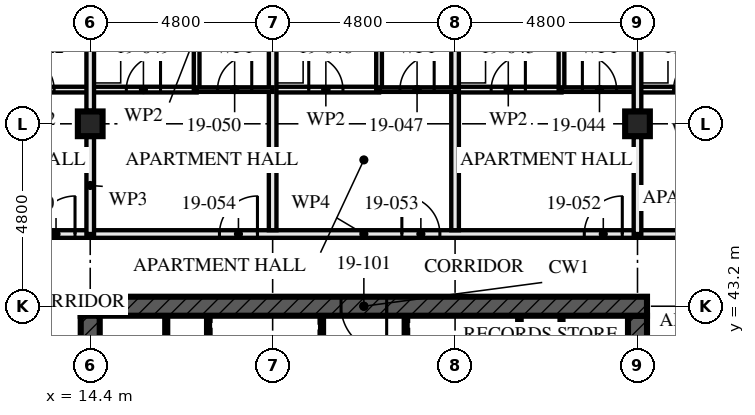
"""IFC4 building model, lengths in metres.
Left out: names, types, materials, properties, quantities, classifications, styles, units other than length and angle.
Written with IfcOpenShell. Run it as: python <this file> out.ifc"""

import sys

from ifc_helpers import new_model, si_unit, direction, frame, frame_2d, origin, origin_2d, place, context, subcontext, project, spatial, rectangle, hollow_rectangle, extrude, element, fill, save


model = new_model("IFC4")
c1 = context("Model", 3, precision=1e-05, world=origin(), true_north=direction((0.0, 1.0)))
c2 = subcontext(c1, "Body", "Model", "MODEL_VIEW")
j1 = project(units=[si_unit("LENGTHUNIT", "METRE"), si_unit("PLANEANGLEUNIT", "RADIAN")], contexts=[c1])
p1 = place(None, origin())
s1 = spatial("IfcSite", under=j1, at=p1, CompositionType="ELEMENT")
p2 = place(p1, origin())
s2 = spatial("IfcBuilding", under=s1, at=p2, CompositionType="ELEMENT")
p3 = place(p2, frame((0.0, 0.0, 72.5)))
s3 = spatial("IfcBuildingStorey", under=s2, at=p3, CompositionType="ELEMENT", Elevation=72.5)
for number, where, z_axis, x_axis in (
    (1, (14.4, 48.0, 0.0), (0.0, 0.0, 1.0), (1.0, 0.0, 0.0)),
    (2, (28.8, 48.0, 0.0), (0.0, 0.0, 1.0), (1.0, 0.0, 0.0)),
):
    element("IfcColumn", number, at=place(p3, frame(where, z_axis=z_axis, x_axis=x_axis)), inside=s3, PredefinedType="COLUMN", context=c2, shape_type="SweptSolid", body=[
        extrude(hollow_rectangle(XDim=0.65, YDim=0.65, WallThickness=0.05, at=origin_2d()), origin(), (0.0, 0.0, 1.0), 3.5),
    ])
p4 = place(p3, frame((29.05, 43.2, -0.17), z_axis=(0.0, 0.0, 1.0), x_axis=(-1.0, 0.0, 0.0)))
e3 = element("IfcWall", 3, at=p4, inside=s3, PredefinedType="SHEAR", context=c2, shape_type="SweptSolid", body=[
    extrude(rectangle(XDim=14.9, YDim=0.5, at=frame_2d((7.45, 0.0))), origin(), (0.0, 0.0, 1.0), 3.5),
])
p5 = place(p4, frame((6.85, 0.0, 0.17)))
e4 = element("IfcOpeningElement", 4, at=p5, cuts=e3, PredefinedType="OPENING", context=c2, shape_type="SweptSolid", body=[
    extrude(rectangle(XDim=1.2, YDim=2.1, at=frame_2d((0.6, 1.05))), frame((0.0, 0.26, 0.0), z_axis=(0.0, -1.0, 0.0), x_axis=(1.0, 0.0, 0.0)), (0.0, 0.0, 1.0), 0.521),
])
p6 = place(p3, frame((14.4, 42.95, -0.17), z_axis=(0.0, 0.0, 1.0), x_axis=(0.0, -1.0, 0.0)))
e5 = element("IfcWall", 5, at=p6, inside=s3, PredefinedType="SHEAR", context=c2, shape_type="SweptSolid", body=[
    extrude(rectangle(XDim=13.9, YDim=0.5, at=frame_2d((6.95, 0.0))), origin(), (0.0, 0.0, 1.0), 3.5),
])
p7 = place(p6, frame((6.35, 0.0, 0.17)))
e6 = element("IfcOpeningElement", 6, at=p7, cuts=e5, PredefinedType="OPENING", context=c2, shape_type="SweptSolid", body=[
    extrude(rectangle(XDim=1.2, YDim=2.1, at=frame_2d((0.6, 1.05))), frame((0.0, 0.26, 0.0), z_axis=(0.0, -1.0, 0.0), x_axis=(1.0, 0.0, 0.0)), (0.0, 0.0, 1.0), 0.521),
])
p8 = place(p3, frame((28.8, 29.05, -0.17), z_axis=(0.0, 0.0, 1.0), x_axis=(0.0, 1.0, 0.0)))
e7 = element("IfcWall", 7, at=p8, inside=s3, PredefinedType="SHEAR", context=c2, shape_type="SweptSolid", body=[
    extrude(rectangle(XDim=13.9, YDim=0.5, at=frame_2d((6.95, 0.0))), origin(), (0.0, 0.0, 1.0), 3.5),
])
p9 = place(p8, frame((6.35, 0.0, 0.17)))
e8 = element("IfcOpeningElement", 8, at=p9, cuts=e7, PredefinedType="OPENING", context=c2, shape_type="SweptSolid", body=[
    extrude(rectangle(XDim=1.2, YDim=2.1, at=frame_2d((0.6, 1.05))), frame((0.0, 0.26, 0.0), z_axis=(0.0, -1.0, 0.0), x_axis=(1.0, 0.0, 0.0)), (0.0, 0.0, 1.0), 0.521),
])
p10 = place(p3, frame((14.4, 48.9, 0.0), z_axis=(0.0, 0.0, 1.0), x_axis=(-1.0, 0.0, 0.0)))
e9 = element("IfcWall", 9, at=p10, inside=s3, PredefinedType="PARTITIONING", context=c2, shape_type="SweptSolid", body=[
    extrude(rectangle(XDim=2.8, YDim=0.15, at=frame_2d((1.4, 0.0))), origin(), (0.0, 0.0, 1.0), 3.33),
])
p11 = place(p10, frame((0.95, 0.0, 0.0)))
e10 = element("IfcOpeningElement", 10, at=p11, cuts=e9, PredefinedType="OPENING", context=c2, shape_type="SweptSolid", body=[
    extrude(rectangle(XDim=0.9, YDim=2.1, at=frame_2d((0.45, 1.05))), frame((0.0, 0.085, 0.0), z_axis=(0.0, -1.0, 0.0), x_axis=(1.0, 0.0, 0.0)), (0.0, 0.0, 1.0), 0.171),
])
p12 = place(p3, frame((14.4, 45.1, 0.0), z_axis=(0.0, 0.0, 1.0), x_axis=(-1.0, 0.0, 0.0)))
e11 = element("IfcWall", 11, at=p12, inside=s3, PredefinedType="PARTITIONING", context=c2, shape_type="SweptSolid", body=[
    extrude(rectangle(XDim=9.6, YDim=0.2, at=frame_2d((4.8, 0.0))), origin(), (0.0, 0.0, 1.0), 3.33),
])
p13 = place(p12, frame((0.4, 0.0, 0.0)))
e12 = element("IfcOpeningElement", 12, at=p13, cuts=e11, PredefinedType="OPENING", context=c2, shape_type="SweptSolid", body=[
    extrude(rectangle(XDim=1.0, YDim=2.1, at=frame_2d((0.5, 1.05))), frame((0.0, 0.111, 0.0), z_axis=(0.0, -1.0, 0.0), x_axis=(1.0, 0.0, 0.0)), (0.0, 0.0, 1.0), 0.221),
])
p14 = place(p12, frame((5.2, 0.0, 0.0)))
e13 = element("IfcOpeningElement", 13, at=p14, cuts=e11, PredefinedType="OPENING", context=c2, shape_type="SweptSolid", body=[
    extrude(rectangle(XDim=1.0, YDim=2.1, at=frame_2d((0.5, 1.05))), frame((0.0, 0.111, 0.0), z_axis=(0.0, -1.0, 0.0), x_axis=(1.0, 0.0, 0.0)), (0.0, 0.0, 1.0), 0.221),
])
p15 = place(p3, frame((26.8, 51.9, 0.0), z_axis=(0.0, 0.0, 1.0), x_axis=(0.0, -1.0, 0.0)))
e14 = element("IfcWall", 14, at=p15, inside=s3, PredefinedType="PARTITIONING", context=c2, shape_type="SweptSolid", body=[
    extrude(rectangle(XDim=3.0, YDim=0.15, at=frame_2d((1.5, 0.0))), origin(), (0.0, 0.0, 1.0), 3.33),
])
p16 = place(p3, frame((26.8, 48.9, 0.0), z_axis=(0.0, 0.0, 1.0), x_axis=(-1.0, 0.0, 0.0)))
e15 = element("IfcWall", 15, at=p16, inside=s3, PredefinedType="PARTITIONING", context=c2, shape_type="SweptSolid", body=[
    extrude(rectangle(XDim=2.8, YDim=0.15, at=frame_2d((1.4, 0.0))), origin(), (0.0, 0.0, 1.0), 3.33),
])
p17 = place(p16, frame((0.95, 0.0, 0.0)))
e16 = element("IfcOpeningElement", 16, at=p17, cuts=e15, PredefinedType="OPENING", context=c2, shape_type="SweptSolid", body=[
    extrude(rectangle(XDim=0.9, YDim=2.1, at=frame_2d((0.45, 1.05))), frame((0.0, 0.085, 0.0), z_axis=(0.0, -1.0, 0.0), x_axis=(1.0, 0.0, 0.0)), (0.0, 0.0, 1.0), 0.171),
])
p18 = place(p3, frame((28.8, 48.9, 0.0), z_axis=(0.0, 0.0, 1.0), x_axis=(-1.0, 0.0, 0.0)))
e17 = element("IfcWall", 17, at=p18, inside=s3, PredefinedType="PARTITIONING", context=c2, shape_type="SweptSolid", body=[
    extrude(rectangle(XDim=2.0, YDim=0.12, at=frame_2d((1.0, 0.0))), origin(), (0.0, 0.0, 1.0), 3.33),
])
p19 = place(p18, frame((0.55, 0.0, 0.0)))
e18 = element("IfcOpeningElement", 18, at=p19, cuts=e17, PredefinedType="OPENING", context=c2, shape_type="SweptSolid", body=[
    extrude(rectangle(XDim=0.9, YDim=2.1, at=frame_2d((0.45, 1.05))), frame((0.0, 0.071, 0.0), z_axis=(0.0, -1.0, 0.0), x_axis=(1.0, 0.0, 0.0)), (0.0, 0.0, 1.0), 0.141),
])
p20 = place(p3, frame((24.0, 57.28, 0.0), z_axis=(0.0, 0.0, 1.0), x_axis=(0.0, -1.0, 0.0)))
e19 = element("IfcWall", 19, at=p20, inside=s3, PredefinedType="PARTITIONING", context=c2, shape_type="SweptSolid", body=[
    extrude(rectangle(XDim=12.08, YDim=0.2, at=frame_2d((6.04, 0.0))), origin(), (0.0, 0.0, 1.0), 2.55),
])
p21 = place(p3, frame((22.0, 51.9, 0.0), z_axis=(0.0, 0.0, 1.0), x_axis=(0.0, -1.0, 0.0)))
e20 = element("IfcWall", 20, at=p21, inside=s3, PredefinedType="PARTITIONING", context=c2, shape_type="SweptSolid", body=[
    extrude(rectangle(XDim=3.0, YDim=0.15, at=frame_2d((1.5, 0.0))), origin(), (0.0, 0.0, 1.0), 3.33),
])
p22 = place(p3, frame((22.0, 48.9, 0.0), z_axis=(0.0, 0.0, 1.0), x_axis=(-1.0, 0.0, 0.0)))
e21 = element("IfcWall", 21, at=p22, inside=s3, PredefinedType="PARTITIONING", context=c2, shape_type="SweptSolid", body=[
    extrude(rectangle(XDim=2.8, YDim=0.15, at=frame_2d((1.4, 0.0))), origin(), (0.0, 0.0, 1.0), 3.33),
])
p23 = place(p22, frame((0.95, 0.0, 0.0)))
e22 = element("IfcOpeningElement", 22, at=p23, cuts=e21, PredefinedType="OPENING", context=c2, shape_type="SweptSolid", body=[
    extrude(rectangle(XDim=0.9, YDim=2.1, at=frame_2d((0.45, 1.05))), frame((0.0, 0.085, 0.0), z_axis=(0.0, -1.0, 0.0), x_axis=(1.0, 0.0, 0.0)), (0.0, 0.0, 1.0), 0.171),
])
p24 = place(p3, frame((24.0, 48.9, 0.0), z_axis=(0.0, 0.0, 1.0), x_axis=(-1.0, 0.0, 0.0)))
e23 = element("IfcWall", 23, at=p24, inside=s3, PredefinedType="PARTITIONING", context=c2, shape_type="SweptSolid", body=[
    extrude(rectangle(XDim=2.0, YDim=0.12, at=frame_2d((1.0, 0.0))), origin(), (0.0, 0.0, 1.0), 3.33),
])
p25 = place(p24, frame((0.55, 0.0, 0.0)))
e24 = element("IfcOpeningElement", 24, at=p25, cuts=e23, PredefinedType="OPENING", context=c2, shape_type="SweptSolid", body=[
    extrude(rectangle(XDim=0.9, YDim=2.1, at=frame_2d((0.45, 1.05))), frame((0.0, 0.071, 0.0), z_axis=(0.0, -1.0, 0.0), x_axis=(1.0, 0.0, 0.0)), (0.0, 0.0, 1.0), 0.141),
])
p26 = place(p3, frame((19.2, 57.28, 0.0), z_axis=(0.0, 0.0, 1.0), x_axis=(0.0, -1.0, 0.0)))
e25 = element("IfcWall", 25, at=p26, inside=s3, PredefinedType="PARTITIONING", context=c2, shape_type="SweptSolid", body=[
    extrude(rectangle(XDim=12.08, YDim=0.2, at=frame_2d((6.04, 0.0))), origin(), (0.0, 0.0, 1.0), 2.55),
])
p27 = place(p3, frame((17.2, 51.9, 0.0), z_axis=(0.0, 0.0, 1.0), x_axis=(0.0, -1.0, 0.0)))
e26 = element("IfcWall", 26, at=p27, inside=s3, PredefinedType="PARTITIONING", context=c2, shape_type="SweptSolid", body=[
    extrude(rectangle(XDim=3.0, YDim=0.15, at=frame_2d((1.5, 0.0))), origin(), (0.0, 0.0, 1.0), 3.33),
])
p28 = place(p3, frame((17.2, 48.9, 0.0), z_axis=(0.0, 0.0, 1.0), x_axis=(-1.0, 0.0, 0.0)))
e27 = element("IfcWall", 27, at=p28, inside=s3, PredefinedType="PARTITIONING", context=c2, shape_type="SweptSolid", body=[
    extrude(rectangle(XDim=2.8, YDim=0.15, at=frame_2d((1.4, 0.0))), origin(), (0.0, 0.0, 1.0), 3.33),
])
p29 = place(p28, frame((0.95, 0.0, 0.0)))
e28 = element("IfcOpeningElement", 28, at=p29, cuts=e27, PredefinedType="OPENING", context=c2, shape_type="SweptSolid", body=[
    extrude(rectangle(XDim=0.9, YDim=2.1, at=frame_2d((0.45, 1.05))), frame((0.0, 0.085, 0.0), z_axis=(0.0, -1.0, 0.0), x_axis=(1.0, 0.0, 0.0)), (0.0, 0.0, 1.0), 0.171),
])
p30 = place(p3, frame((19.2, 48.9, 0.0), z_axis=(0.0, 0.0, 1.0), x_axis=(-1.0, 0.0, 0.0)))
e29 = element("IfcWall", 29, at=p30, inside=s3, PredefinedType="PARTITIONING", context=c2, shape_type="SweptSolid", body=[
    extrude(rectangle(XDim=2.0, YDim=0.12, at=frame_2d((1.0, 0.0))), origin(), (0.0, 0.0, 1.0), 3.33),
])
p31 = place(p30, frame((0.55, 0.0, 0.0)))
e30 = element("IfcOpeningElement", 30, at=p31, cuts=e29, PredefinedType="OPENING", context=c2, shape_type="SweptSolid", body=[
    extrude(rectangle(XDim=0.9, YDim=2.1, at=frame_2d((0.45, 1.05))), frame((0.0, 0.071, 0.0), z_axis=(0.0, -1.0, 0.0), x_axis=(1.0, 0.0, 0.0)), (0.0, 0.0, 1.0), 0.141),
])
p32 = place(p3, frame((28.8, 45.1, 0.0), z_axis=(0.0, 0.0, 1.0), x_axis=(-1.0, 0.0, 0.0)))
e31 = element("IfcWall", 31, at=p32, inside=s3, PredefinedType="PARTITIONING", context=c2, shape_type="SweptSolid", body=[
    extrude(rectangle(XDim=14.4, YDim=0.2, at=frame_2d((7.2, 0.0))), origin(), (0.0, 0.0, 1.0), 3.33),
])
p33 = place(p32, frame((0.4, 0.0, 0.0)))
e32 = element("IfcOpeningElement", 32, at=p33, cuts=e31, PredefinedType="OPENING", context=c2, shape_type="SweptSolid", body=[
    extrude(rectangle(XDim=1.0, YDim=2.1, at=frame_2d((0.5, 1.05))), frame((0.0, 0.111, 0.0), z_axis=(0.0, -1.0, 0.0), x_axis=(1.0, 0.0, 0.0)), (0.0, 0.0, 1.0), 0.221),
])
p34 = place(p32, frame((5.2, 0.0, 0.0)))
e33 = element("IfcOpeningElement", 33, at=p34, cuts=e31, PredefinedType="OPENING", context=c2, shape_type="SweptSolid", body=[
    extrude(rectangle(XDim=1.0, YDim=2.1, at=frame_2d((0.5, 1.05))), frame((0.0, 0.111, 0.0), z_axis=(0.0, -1.0, 0.0), x_axis=(1.0, 0.0, 0.0)), (0.0, 0.0, 1.0), 0.221),
])
p35 = place(p32, frame((10.0, 0.0, 0.0)))
e34 = element("IfcOpeningElement", 34, at=p35, cuts=e31, PredefinedType="OPENING", context=c2, shape_type="SweptSolid", body=[
    extrude(rectangle(XDim=1.0, YDim=2.1, at=frame_2d((0.5, 1.05))), frame((0.0, 0.111, 0.0), z_axis=(0.0, -1.0, 0.0), x_axis=(1.0, 0.0, 0.0)), (0.0, 0.0, 1.0), 0.221),
])
p36 = place(p3, frame((31.6, 48.9, 0.0), z_axis=(0.0, 0.0, 1.0), x_axis=(-1.0, 0.0, 0.0)))
e35 = element("IfcWall", 35, at=p36, inside=s3, PredefinedType="PARTITIONING", context=c2, shape_type="SweptSolid", body=[
    extrude(rectangle(XDim=2.8, YDim=0.15, at=frame_2d((1.4, 0.0))), origin(), (0.0, 0.0, 1.0), 3.33),
])
p37 = place(p36, frame((0.95, 0.0, 0.0)))
e36 = element("IfcOpeningElement", 36, at=p37, cuts=e35, PredefinedType="OPENING", context=c2, shape_type="SweptSolid", body=[
    extrude(rectangle(XDim=0.9, YDim=2.1, at=frame_2d((0.45, 1.05))), frame((0.0, 0.085, 0.0), z_axis=(0.0, -1.0, 0.0), x_axis=(1.0, 0.0, 0.0)), (0.0, 0.0, 1.0), 0.171),
])
p38 = place(p3, frame((38.4, 45.1, 0.0), z_axis=(0.0, 0.0, 1.0), x_axis=(-1.0, 0.0, 0.0)))
e37 = element("IfcWall", 37, at=p38, inside=s3, PredefinedType="PARTITIONING", context=c2, shape_type="SweptSolid", body=[
    extrude(rectangle(XDim=9.6, YDim=0.2, at=frame_2d((4.8, 0.0))), origin(), (0.0, 0.0, 1.0), 3.33),
])
p39 = place(p38, frame((0.4, 0.0, 0.0)))
e38 = element("IfcOpeningElement", 38, at=p39, cuts=e37, PredefinedType="OPENING", context=c2, shape_type="SweptSolid", body=[
    extrude(rectangle(XDim=1.0, YDim=2.1, at=frame_2d((0.5, 1.05))), frame((0.0, 0.111, 0.0), z_axis=(0.0, -1.0, 0.0), x_axis=(1.0, 0.0, 0.0)), (0.0, 0.0, 1.0), 0.221),
])
p40 = place(p38, frame((5.2, 0.0, 0.0)))
e39 = element("IfcOpeningElement", 39, at=p40, cuts=e37, PredefinedType="OPENING", context=c2, shape_type="SweptSolid", body=[
    extrude(rectangle(XDim=1.0, YDim=2.1, at=frame_2d((0.5, 1.05))), frame((0.0, 0.111, 0.0), z_axis=(0.0, -1.0, 0.0), x_axis=(1.0, 0.0, 0.0)), (0.0, 0.0, 1.0), 0.221),
])
for number, where, z_axis, x_axis in (
    (40, (16.4, 37.15, 0.0), (0.0, 0.0, 1.0), (0.0, 1.0, 0.0)),
    (41, (26.8, 37.15, 0.0), (0.0, 0.0, 1.0), (0.0, 1.0, 0.0)),
):
    element("IfcWall", number, at=place(p3, frame(where, z_axis=z_axis, x_axis=x_axis)), inside=s3, PredefinedType="SOLIDWALL", context=c2, shape_type="SweptSolid", body=[
        extrude(rectangle(XDim=5.8, YDim=0.1, at=frame_2d((2.9, 0.0))), origin(), (0.0, 0.0, 1.0), 3.33),
    ])
p41 = place(p3, frame((20.5, 37.15, 0.0), z_axis=(0.0, 0.0, 1.0), x_axis=(0.0, 1.0, 0.0)))
e42 = element("IfcWall", 42, at=p41, inside=s3, PredefinedType="SOLIDWALL", context=c2, shape_type="SweptSolid", body=[
    extrude(rectangle(XDim=5.8, YDim=0.1, at=frame_2d((2.9, 0.0))), origin(), (0.0, 0.0, 1.0), 3.33),
])
p42 = place(p41, frame((0.925, 0.0, 0.0)))
e43 = element("IfcOpeningElement", 43, at=p42, cuts=e42, PredefinedType="OPENING", context=c2, shape_type="SweptSolid", body=[
    extrude(rectangle(XDim=1.0, YDim=2.1, at=frame_2d((0.5, 1.05))), frame((0.0, 0.061, 0.0), z_axis=(0.0, -1.0, 0.0), x_axis=(1.0, 0.0, 0.0)), (0.0, 0.0, 1.0), 0.121),
])
p43 = place(p41, frame((3.9, 0.0, 0.0)))
e44 = element("IfcOpeningElement", 44, at=p43, cuts=e42, PredefinedType="OPENING", context=c2, shape_type="SweptSolid", body=[
    extrude(rectangle(XDim=1.0, YDim=2.1, at=frame_2d((0.5, 1.05))), frame((0.0, 0.061, 0.0), z_axis=(0.0, -1.0, 0.0), x_axis=(1.0, 0.0, 0.0)), (0.0, 0.0, 1.0), 0.121),
])
for number, where, z_axis, x_axis in (
    (45, (22.7, 37.15, 0.0), (0.0, 0.0, 1.0), (0.0, 1.0, 0.0)),
    (46, (17.5, 37.15, 0.0), (0.0, 0.0, 1.0), (0.0, 1.0, 0.0)),
    (47, (25.7, 37.15, 0.0), (0.0, 0.0, 1.0), (0.0, 1.0, 0.0)),
):
    element("IfcWall", number, at=place(p3, frame(where, z_axis=z_axis, x_axis=x_axis)), inside=s3, PredefinedType="SOLIDWALL", context=c2, shape_type="SweptSolid", body=[
        extrude(rectangle(XDim=5.8, YDim=0.1, at=frame_2d((2.9, 0.0))), origin(), (0.0, 0.0, 1.0), 3.33),
    ])
p44 = place(p3, frame((14.4, 45.1, 0.0), z_axis=(0.0, 0.0, 1.0), x_axis=(0.0, 1.0, 0.0)))
e48 = element("IfcWall", 48, at=p44, inside=s3, PredefinedType="PARTITIONING", context=c2, shape_type="SweptSolid", body=[
    extrude(rectangle(XDim=2.555, YDim=0.2, at=frame_2d((1.277, 0.0))), origin(), (0.0, 0.0, 1.0), 2.32),
])
p45 = place(p3, frame((14.4, 48.345, 0.0), z_axis=(0.0, 0.0, 1.0), x_axis=(0.0, 1.0, 0.0)))
e49 = element("IfcWall", 49, at=p45, inside=s3, PredefinedType="PARTITIONING", context=c2, shape_type="SweptSolid", body=[
    extrude(rectangle(XDim=4.11, YDim=0.2, at=frame_2d((2.055, 0.0))), origin(), (0.0, 0.0, 1.0), 2.32),
])
p46 = place(p3, frame((28.8, 45.1, 0.0), z_axis=(0.0, 0.0, 1.0), x_axis=(0.0, 1.0, 0.0)))
e50 = element("IfcWall", 50, at=p46, inside=s3, PredefinedType="PARTITIONING", context=c2, shape_type="SweptSolid", body=[
    extrude(rectangle(XDim=2.555, YDim=0.2, at=frame_2d((1.277, 0.0))), origin(), (0.0, 0.0, 1.0), 2.32),
])
p47 = place(p3, frame((28.8, 48.345, 0.0), z_axis=(0.0, 0.0, 1.0), x_axis=(0.0, 1.0, 0.0)))
e51 = element("IfcWall", 51, at=p47, inside=s3, PredefinedType="PARTITIONING", context=c2, shape_type="SweptSolid", body=[
    extrude(rectangle(XDim=4.11, YDim=0.2, at=frame_2d((2.055, 0.0))), origin(), (0.0, 0.0, 1.0), 2.32),
])
p48 = place(p11, frame((0.9, 0.0, 0.0), z_axis=(0.0, 0.0, 1.0), x_axis=(-1.0, 0.0, 0.0)))
e52 = element("IfcDoor", 52, at=p48, inside=s3, OperationType="SINGLE_SWING_RIGHT", PredefinedType="DOOR", context=c2, shape_type="SweptSolid", body=[
    extrude(rectangle(XDim=0.9, YDim=2.1, at=frame_2d((0.45, 1.05))), frame((0.0, 0.022, 0.0), z_axis=(0.0, -1.0, 0.0), x_axis=(1.0, 0.0, 0.0)), (0.0, 0.0, 1.0), 0.044),
])
fill(e10, e52)
p49 = place(p13, frame((1.0, 0.0, 0.0), z_axis=(0.0, 0.0, 1.0), x_axis=(-1.0, 0.0, 0.0)))
e53 = element("IfcDoor", 53, at=p49, inside=s3, OperationType="SINGLE_SWING_LEFT", PredefinedType="DOOR", context=c2, shape_type="SweptSolid", body=[
    extrude(rectangle(XDim=1.0, YDim=2.1, at=frame_2d((0.5, 1.05))), frame((0.0, 0.027, 0.0), z_axis=(0.0, -1.0, 0.0), x_axis=(1.0, 0.0, 0.0)), (0.0, 0.0, 1.0), 0.054),
])
fill(e12, e53)
p50 = place(p17, frame((0.9, 0.0, 0.0), z_axis=(0.0, 0.0, 1.0), x_axis=(-1.0, 0.0, 0.0)))
e54 = element("IfcDoor", 54, at=p50, inside=s3, OperationType="SINGLE_SWING_LEFT", PredefinedType="DOOR", context=c2, shape_type="SweptSolid", body=[
    extrude(rectangle(XDim=0.9, YDim=2.1, at=frame_2d((0.45, 1.05))), frame((0.0, 0.022, 0.0), z_axis=(0.0, -1.0, 0.0), x_axis=(1.0, 0.0, 0.0)), (0.0, 0.0, 1.0), 0.044),
])
fill(e16, e54)
p51 = place(p19, frame((0.9, 0.0, 0.0), z_axis=(0.0, 0.0, 1.0), x_axis=(-1.0, 0.0, 0.0)))
e55 = element("IfcDoor", 55, at=p51, inside=s3, OperationType="SINGLE_SWING_RIGHT", PredefinedType="DOOR", context=c2, shape_type="SweptSolid", body=[
    extrude(rectangle(XDim=0.9, YDim=2.1, at=frame_2d((0.45, 1.05))), frame((0.0, 0.022, 0.0), z_axis=(0.0, -1.0, 0.0), x_axis=(1.0, 0.0, 0.0)), (0.0, 0.0, 1.0), 0.044),
])
fill(e18, e55)
p52 = place(p23, frame((0.9, 0.0, 0.0), z_axis=(0.0, 0.0, 1.0), x_axis=(-1.0, 0.0, 0.0)))
e56 = element("IfcDoor", 56, at=p52, inside=s3, OperationType="SINGLE_SWING_RIGHT", PredefinedType="DOOR", context=c2, shape_type="SweptSolid", body=[
    extrude(rectangle(XDim=0.9, YDim=2.1, at=frame_2d((0.45, 1.05))), frame((0.0, 0.022, 0.0), z_axis=(0.0, -1.0, 0.0), x_axis=(1.0, 0.0, 0.0)), (0.0, 0.0, 1.0), 0.044),
])
fill(e22, e56)
p53 = place(p25, frame((0.9, 0.0, 0.0), z_axis=(0.0, 0.0, 1.0), x_axis=(-1.0, 0.0, 0.0)))
e57 = element("IfcDoor", 57, at=p53, inside=s3, OperationType="SINGLE_SWING_LEFT", PredefinedType="DOOR", context=c2, shape_type="SweptSolid", body=[
    extrude(rectangle(XDim=0.9, YDim=2.1, at=frame_2d((0.45, 1.05))), frame((0.0, 0.022, 0.0), z_axis=(0.0, -1.0, 0.0), x_axis=(1.0, 0.0, 0.0)), (0.0, 0.0, 1.0), 0.044),
])
fill(e24, e57)
p54 = place(p29, frame((0.9, 0.0, 0.0), z_axis=(0.0, 0.0, 1.0), x_axis=(-1.0, 0.0, 0.0)))
e58 = element("IfcDoor", 58, at=p54, inside=s3, OperationType="SINGLE_SWING_LEFT", PredefinedType="DOOR", context=c2, shape_type="SweptSolid", body=[
    extrude(rectangle(XDim=0.9, YDim=2.1, at=frame_2d((0.45, 1.05))), frame((0.0, 0.022, 0.0), z_axis=(0.0, -1.0, 0.0), x_axis=(1.0, 0.0, 0.0)), (0.0, 0.0, 1.0), 0.044),
])
fill(e28, e58)
p55 = place(p31, frame((0.9, 0.0, 0.0), z_axis=(0.0, 0.0, 1.0), x_axis=(-1.0, 0.0, 0.0)))
e59 = element("IfcDoor", 59, at=p55, inside=s3, OperationType="SINGLE_SWING_LEFT", PredefinedType="DOOR", context=c2, shape_type="SweptSolid", body=[
    extrude(rectangle(XDim=0.9, YDim=2.1, at=frame_2d((0.45, 1.05))), frame((0.0, 0.022, 0.0), z_axis=(0.0, -1.0, 0.0), x_axis=(1.0, 0.0, 0.0)), (0.0, 0.0, 1.0), 0.044),
])
fill(e30, e59)
p56 = place(p33, frame((1.0, 0.0, 0.0), z_axis=(0.0, 0.0, 1.0), x_axis=(-1.0, 0.0, 0.0)))
e60 = element("IfcDoor", 60, at=p56, inside=s3, OperationType="SINGLE_SWING_LEFT", PredefinedType="DOOR", context=c2, shape_type="SweptSolid", body=[
    extrude(rectangle(XDim=1.0, YDim=2.1, at=frame_2d((0.5, 1.05))), frame((0.0, 0.027, 0.0), z_axis=(0.0, -1.0, 0.0), x_axis=(1.0, 0.0, 0.0)), (0.0, 0.0, 1.0), 0.054),
])
fill(e32, e60)
p57 = place(p34, frame((1.0, 0.0, 0.0), z_axis=(0.0, 0.0, 1.0), x_axis=(-1.0, 0.0, 0.0)))
e61 = element("IfcDoor", 61, at=p57, inside=s3, OperationType="SINGLE_SWING_RIGHT", PredefinedType="DOOR", context=c2, shape_type="SweptSolid", body=[
    extrude(rectangle(XDim=1.0, YDim=2.1, at=frame_2d((0.5, 1.05))), frame((0.0, 0.027, 0.0), z_axis=(0.0, -1.0, 0.0), x_axis=(1.0, 0.0, 0.0)), (0.0, 0.0, 1.0), 0.054),
])
fill(e33, e61)
p58 = place(p35, frame((1.0, 0.0, 0.0), z_axis=(0.0, 0.0, 1.0), x_axis=(-1.0, 0.0, 0.0)))
e62 = element("IfcDoor", 62, at=p58, inside=s3, OperationType="SINGLE_SWING_LEFT", PredefinedType="DOOR", context=c2, shape_type="SweptSolid", body=[
    extrude(rectangle(XDim=1.0, YDim=2.1, at=frame_2d((0.5, 1.05))), frame((0.0, 0.027, 0.0), z_axis=(0.0, -1.0, 0.0), x_axis=(1.0, 0.0, 0.0)), (0.0, 0.0, 1.0), 0.054),
])
fill(e34, e62)
p59 = place(p37, frame((0.9, 0.0, 0.0), z_axis=(0.0, 0.0, 1.0), x_axis=(-1.0, 0.0, 0.0)))
e63 = element("IfcDoor", 63, at=p59, inside=s3, OperationType="SINGLE_SWING_LEFT", PredefinedType="DOOR", context=c2, shape_type="SweptSolid", body=[
    extrude(rectangle(XDim=0.9, YDim=2.1, at=frame_2d((0.45, 1.05))), frame((0.0, 0.022, 0.0), z_axis=(0.0, -1.0, 0.0), x_axis=(1.0, 0.0, 0.0)), (0.0, 0.0, 1.0), 0.044),
])
fill(e36, e63)
p60 = place(p5, origin())
e64 = element("IfcDoor", 64, at=p60, inside=s3, OperationType="SINGLE_SWING_LEFT", PredefinedType="DOOR", context=c2, shape_type="SweptSolid", body=[
    extrude(rectangle(XDim=1.2, YDim=2.1, at=frame_2d((0.6, 1.05))), frame((0.0, 0.027, 0.0), z_axis=(0.0, -1.0, 0.0), x_axis=(1.0, 0.0, 0.0)), (0.0, 0.0, 1.0), 0.054),
])
fill(e4, e64)
save(model, sys.argv[1])
